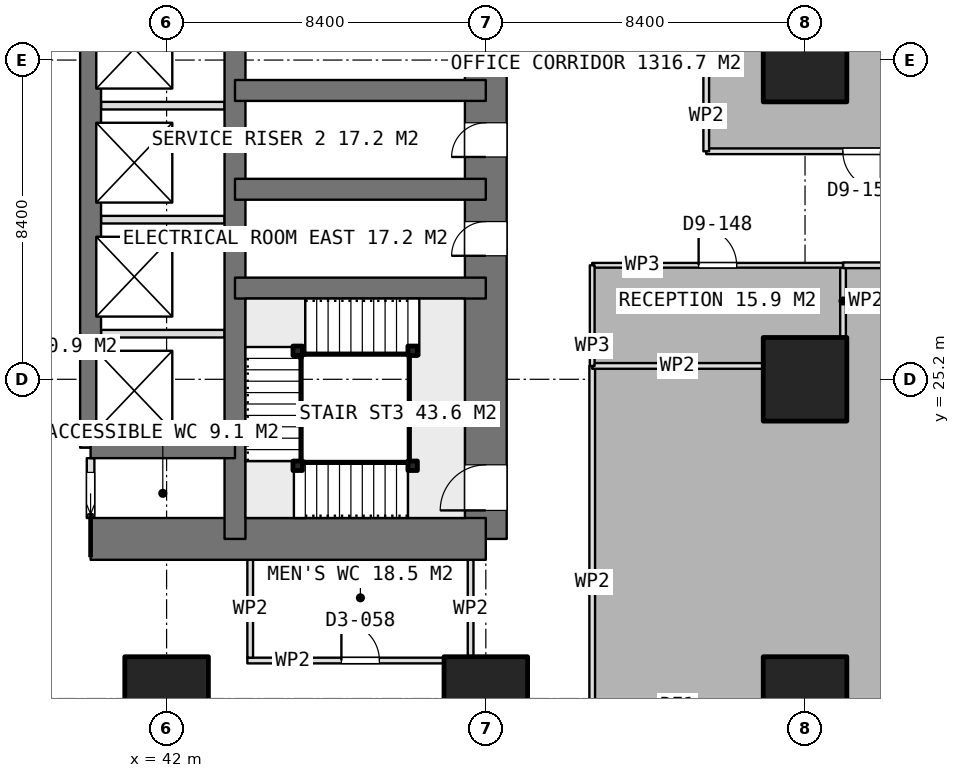
"""IFC4 building model, lengths in metres.
Left out: names, types, materials, properties, quantities, classifications, styles, units other than length and angle.
Written with IfcOpenShell. Run it as: python <this file> out.ifc"""

import sys

from ifc_helpers import new_model, si_unit, direction, frame, frame_2d, origin, origin_2d, place, context, subcontext, project, spatial, rectangle, extrude, element, fill, save


model = new_model("IFC4")
c1 = context("Model", 3, precision=1e-05, world=origin(), true_north=direction((0.0, 1.0)))
c2 = subcontext(c1, "Body", "Model", "MODEL_VIEW")
j1 = project(units=[si_unit("LENGTHUNIT", "METRE"), si_unit("PLANEANGLEUNIT", "RADIAN")], contexts=[c1])
p1 = place(None, origin())
s1 = spatial("IfcSite", under=j1, at=p1, CompositionType="ELEMENT")
p2 = place(p1, origin())
s2 = spatial("IfcBuilding", under=s1, at=p2, CompositionType="ELEMENT")
p3 = place(p2, frame((0.0, 0.0, 51.65)))
s3 = spatial("IfcBuildingStorey", under=s2, at=p3, CompositionType="ELEMENT", Elevation=51.65)
p4 = place(p3, frame((40.0, 21.0, 0.0), z_axis=(0.0, 0.0, 1.0), x_axis=(1.0, 0.0, 0.0)))
e1 = element("IfcWall", 1, at=p4, inside=s3, PredefinedType="SHEAR", context=c2, shape_type="SweptSolid", body=[
    extrude(rectangle(XDim=10.4, YDim=1.1, at=frame_2d((5.2, 0.0))), origin(), (0.0, 0.0, 1.0), 3.75),
])
p5 = place(p3, frame((50.4, 21.0, 0.0), z_axis=(0.0, 0.0, 1.0), x_axis=(0.0, 1.0, 0.0)))
e2 = element("IfcWall", 2, at=p5, inside=s3, PredefinedType="SHEAR", context=c2, shape_type="SweptSolid", body=[
    extrude(rectangle(XDim=25.2, YDim=1.1, at=frame_2d((12.6, 0.0))), origin(), (0.0, 0.0, 1.0), 3.75),
])
p6 = place(p5, frame((16.2, 0.0, 0.0)))
e3 = element("IfcOpeningElement", 3, at=p6, cuts=e2, PredefinedType="OPENING", context=c2, shape_type="SweptSolid", body=[
    extrude(rectangle(XDim=1.2, YDim=2.1, at=frame_2d((0.6, 1.05))), frame((0.0, 0.56, 0.0), z_axis=(0.0, -1.0, 0.0), x_axis=(1.0, 0.0, 0.0)), (0.0, 0.0, 1.0), 1.12),
])
p7 = place(p5, frame((10.05, 0.0, 0.0)))
e4 = element("IfcOpeningElement", 4, at=p7, cuts=e2, PredefinedType="OPENING", context=c2, shape_type="SweptSolid", body=[
    extrude(rectangle(XDim=0.9, YDim=2.1, at=frame_2d((0.45, 1.05))), frame((0.0, 0.56, 0.0), z_axis=(0.0, -1.0, 0.0), x_axis=(1.0, 0.0, 0.0)), (0.0, 0.0, 1.0), 1.12),
])
p8 = place(p5, frame((7.45, 0.0, 0.0)))
e5 = element("IfcOpeningElement", 5, at=p8, cuts=e2, PredefinedType="OPENING", context=c2, shape_type="SweptSolid", body=[
    extrude(rectangle(XDim=0.9, YDim=2.1, at=frame_2d((0.45, 1.05))), frame((0.0, 0.56, 0.0), z_axis=(0.0, -1.0, 0.0), x_axis=(1.0, 0.0, 0.0)), (0.0, 0.0, 1.0), 1.12),
])
p9 = place(p5, frame((0.75, 0.0, 0.0)))
e6 = element("IfcOpeningElement", 6, at=p9, cuts=e2, PredefinedType="OPENING", context=c2, shape_type="SweptSolid", body=[
    extrude(rectangle(XDim=1.2, YDim=2.1, at=frame_2d((0.6, 1.05))), frame((0.0, 0.56, 0.0), z_axis=(0.0, -1.0, 0.0), x_axis=(1.0, 0.0, 0.0)), (0.0, 0.0, 1.0), 1.12),
])
p10 = place(p3, frame((43.8, 21.0, 0.0), z_axis=(0.0, 0.0, 1.0), x_axis=(0.0, 1.0, 0.0)))
e7 = element("IfcWall", 7, at=p10, inside=s3, PredefinedType="SHEAR", context=c2, shape_type="SweptSolid", body=[
    extrude(rectangle(XDim=25.2, YDim=0.55, at=frame_2d((12.6, 0.0))), origin(), (0.0, 0.0, 1.0), 3.75),
])
p11 = place(p3, frame((40.0, 23.4, 0.0), z_axis=(0.0, 0.0, 1.0), x_axis=(0.0, 1.0, 0.0)))
e8 = element("IfcWall", 8, at=p11, inside=s3, PredefinedType="SHEAR", context=c2, shape_type="SweptSolid", body=[
    extrude(rectangle(XDim=18.0, YDim=0.55, at=frame_2d((9.0, 0.0))), origin(), (0.0, 0.0, 1.0), 3.75),
])
p12 = place(p3, frame((40.0, 23.4, 0.0), z_axis=(0.0, 0.0, 1.0), x_axis=(1.0, 0.0, 0.0)))
e9 = element("IfcWall", 9, at=p12, inside=s3, PredefinedType="SHEAR", context=c2, shape_type="SweptSolid", body=[
    extrude(rectangle(XDim=3.8, YDim=0.55, at=frame_2d((1.9, 0.0))), origin(), (0.0, 0.0, 1.0), 3.75),
])
for number, where, z_axis, x_axis in (
    (10, (43.8, 27.6, 0.0), (0.0, 0.0, 1.0), (1.0, 0.0, 0.0)),
    (11, (43.8, 30.2, 0.0), (0.0, 0.0, 1.0), (1.0, 0.0, 0.0)),
    (12, (43.8, 32.8, 0.0), (0.0, 0.0, 1.0), (1.0, 0.0, 0.0)),
):
    element("IfcWall", number, at=place(p3, frame(where, z_axis=z_axis, x_axis=x_axis)), inside=s3, PredefinedType="SHEAR", context=c2, shape_type="SweptSolid", body=[
        extrude(rectangle(XDim=6.6, YDim=0.55, at=frame_2d((3.3, 0.0))), origin(), (0.0, 0.0, 1.0), 3.75),
    ])
for number, where, z_axis, x_axis in (
    (13, (42.0, 16.8, 0.0), (0.0, 0.0, 1.0), (1.0, 0.0, 0.0)),
    (14, (50.4, 16.8, 0.0), (0.0, 0.0, 1.0), (1.0, 0.0, 0.0)),
    (15, (58.8, 16.8, 0.0), (0.0, 0.0, 1.0), (1.0, 0.0, 0.0)),
    (16, (58.8, 25.2, 0.0), (0.0, 0.0, 1.0), (1.0, 0.0, 0.0)),
    (17, (58.8, 33.6, 0.0), (0.0, 0.0, 1.0), (1.0, 0.0, 0.0)),
):
    element("IfcColumn", number, at=place(p3, frame(where, z_axis=z_axis, x_axis=x_axis)), inside=s3, PredefinedType="COLUMN", context=c2, shape_type="SweptSolid", body=[
        extrude(rectangle(XDim=2.2, YDim=2.2, at=origin_2d()), origin(), (0.0, 0.0, 1.0), 3.75),
    ])
for number, where, z_axis, x_axis in (
    (18, (40.275, 26.4, 0.0), (0.0, 0.0, 1.0), (1.0, 0.0, 0.0)),
    (19, (40.275, 29.4, 0.0), (0.0, 0.0, 1.0), (1.0, 0.0, 0.0)),
    (20, (40.275, 32.4, 0.0), (0.0, 0.0, 1.0), (1.0, 0.0, 0.0)),
):
    element("IfcWall", number, at=place(p3, frame(where, z_axis=z_axis, x_axis=x_axis)), inside=s3, PredefinedType="PARTITIONING", context=c2, shape_type="SweptSolid", body=[
        extrude(rectangle(XDim=3.25, YDim=0.2, at=frame_2d((1.625, 0.0))), origin(), (0.0, 0.0, 1.0), 3.5),
    ])
p13 = place(p3, frame((40.0, 21.55, 0.0), z_axis=(0.0, 0.0, 1.0), x_axis=(0.0, 1.0, 0.0)))
e21 = element("IfcWall", 21, at=p13, inside=s3, PredefinedType="PARTITIONING", context=c2, shape_type="SweptSolid", body=[
    extrude(rectangle(XDim=1.575, YDim=0.2, at=frame_2d((0.788, 0.0))), origin(), (0.0, 0.0, 1.0), 3.5),
])
p14 = place(p13, frame((0.1, 0.0, 0.0)))
e22 = element("IfcOpeningElement", 22, at=p14, cuts=e21, PredefinedType="OPENING", context=c2, shape_type="SweptSolid", body=[
    extrude(rectangle(XDim=1.1, YDim=2.1, at=frame_2d((0.55, 1.05))), frame((0.0, 0.11, 0.0), z_axis=(0.0, -1.0, 0.0), x_axis=(1.0, 0.0, 0.0)), (0.0, 0.0, 1.0), 0.22),
])
p15 = place(p3, frame((44.125, 17.8, 0.0), z_axis=(0.0, 0.0, 1.0), x_axis=(1.0, 0.0, 0.0)))
e23 = element("IfcWall", 23, at=p15, inside=s3, PredefinedType="PARTITIONING", context=c2, shape_type="SweptSolid", body=[
    extrude(rectangle(XDim=5.95, YDim=0.15, at=frame_2d((2.975, 0.0))), origin(), (0.0, 0.0, 1.0), 3.5),
])
p16 = place(p15, frame((2.475, 0.0, 0.0)))
e24 = element("IfcOpeningElement", 24, at=p16, cuts=e23, PredefinedType="OPENING", context=c2, shape_type="SweptSolid", body=[
    extrude(rectangle(XDim=1.0, YDim=2.1, at=frame_2d((0.5, 1.05))), frame((0.0, 0.085, 0.0), z_axis=(0.0, -1.0, 0.0), x_axis=(1.0, 0.0, 0.0)), (0.0, 0.0, 1.0), 0.17),
])
for number, where, z_axis, x_axis in (
    (25, (44.2, 17.875, 0.0), (0.0, 0.0, 1.0), (0.0, 1.0, 0.0)),
    (26, (50.0, 17.875, 0.0), (0.0, 0.0, 1.0), (0.0, 1.0, 0.0)),
):
    element("IfcWall", number, at=place(p3, frame(where, z_axis=z_axis, x_axis=x_axis)), inside=s3, PredefinedType="PARTITIONING", context=c2, shape_type="SweptSolid", body=[
        extrude(rectangle(XDim=2.575, YDim=0.15, at=frame_2d((1.288, 0.0))), origin(), (0.0, 0.0, 1.0), 3.5),
    ])
p17 = place(p3, frame((53.2, 14.2, 0.0), z_axis=(0.0, 0.0, 1.0), x_axis=(0.0, 1.0, 0.0)))
e27 = element("IfcWall", 27, at=p17, inside=s3, PredefinedType="PARTITIONING", context=c2, shape_type="SweptSolid", body=[
    extrude(rectangle(XDim=11.352, YDim=0.15, at=frame_2d((5.676, 0.0))), origin(), (0.0, 0.0, 1.0), 3.5),
])
p18 = place(p3, frame((53.2, 25.552, 0.0), z_axis=(0.0, 0.0, 1.0), x_axis=(1.0, 0.0, 0.0)))
e28 = element("IfcWall", 28, at=p18, inside=s3, PredefinedType="PARTITIONING", context=c2, shape_type="SweptSolid", body=[
    extrude(rectangle(XDim=4.48, YDim=0.15, at=frame_2d((2.24, 0.0))), origin(), (0.0, 0.0, 1.0), 3.5),
])
p19 = place(p3, frame((59.8, 26.32, 0.0), z_axis=(0.0, 0.0, 1.0), x_axis=(0.0, 1.0, 0.0)))
e29 = element("IfcWall", 29, at=p19, inside=s3, PredefinedType="PARTITIONING", context=c2, shape_type="SweptSolid", body=[
    extrude(rectangle(XDim=1.88, YDim=0.15, at=frame_2d((0.94, 0.0))), origin(), (0.0, 0.0, 1.0), 3.5),
])
p20 = place(p3, frame((59.8, 28.2, 0.0), z_axis=(0.0, 0.0, 1.0), x_axis=(1.0, 0.0, 0.0)))
e30 = element("IfcWall", 30, at=p20, inside=s3, PredefinedType="PARTITIONING", context=c2, shape_type="SweptSolid", body=[
    extrude(rectangle(XDim=4.719, YDim=0.15, at=frame_2d((2.359, 0.0))), origin(), (0.0, 0.0, 1.0), 3.5),
])
p21 = place(p3, frame((53.2, 28.2, 0.0), z_axis=(0.0, 0.0, 1.0), x_axis=(1.0, 0.0, 0.0)))
e31 = element("IfcWall", 31, at=p21, inside=s3, PredefinedType="PARTITIONING", context=c2, shape_type="SweptSolid", body=[
    extrude(rectangle(XDim=6.6, YDim=0.125, at=frame_2d((3.3, 0.0))), origin(), (0.0, 0.0, 1.0), 3.5),
])
p22 = place(p21, frame((2.8, 0.0, 0.0)))
e32 = element("IfcOpeningElement", 32, at=p22, cuts=e31, PredefinedType="OPENING", context=c2, shape_type="SweptSolid", body=[
    extrude(rectangle(XDim=1.0, YDim=2.1, at=frame_2d((0.5, 1.05))), frame((0.0, 0.073, 0.0), z_axis=(0.0, -1.0, 0.0), x_axis=(1.0, 0.0, 0.0)), (0.0, 0.0, 1.0), 0.145),
])
p23 = place(p3, frame((53.2, 25.552, 0.0), z_axis=(0.0, 0.0, 1.0), x_axis=(0.0, 1.0, 0.0)))
e33 = element("IfcWall", 33, at=p23, inside=s3, PredefinedType="PARTITIONING", context=c2, shape_type="SweptSolid", body=[
    extrude(rectangle(XDim=2.648, YDim=0.125, at=frame_2d((1.324, 0.0))), origin(), (0.0, 0.0, 1.0), 3.5),
])
p24 = place(p3, frame((64.391, 31.2, 0.0), z_axis=(0.0, 0.0, 1.0), x_axis=(-1.0, 0.0, 0.0)))
e34 = element("IfcWall", 34, at=p24, inside=s3, PredefinedType="PARTITIONING", context=c2, shape_type="SweptSolid", body=[
    extrude(rectangle(XDim=8.191, YDim=0.15, at=frame_2d((4.096, 0.0))), origin(), (0.0, 0.0, 1.0), 3.5),
])
p25 = place(p24, frame((3.596, 0.0, 0.0)))
e35 = element("IfcOpeningElement", 35, at=p25, cuts=e34, PredefinedType="OPENING", context=c2, shape_type="SweptSolid", body=[
    extrude(rectangle(XDim=1.0, YDim=2.1, at=frame_2d((0.5, 1.05))), frame((0.0, 0.085, 0.0), z_axis=(0.0, -1.0, 0.0), x_axis=(1.0, 0.0, 0.0)), (0.0, 0.0, 1.0), 0.17),
])
p26 = place(p3, frame((56.2, 31.2, 0.0), z_axis=(0.0, 0.0, 1.0), x_axis=(0.0, 1.0, 0.0)))
e36 = element("IfcWall", 36, at=p26, inside=s3, PredefinedType="PARTITIONING", context=c2, shape_type="SweptSolid", body=[
    extrude(rectangle(XDim=4.6, YDim=0.15, at=frame_2d((2.3, 0.0))), origin(), (0.0, 0.0, 1.0), 3.5),
])
for number, where, z_axis, x_axis in (
    (37, (48.475, 22.925, 0.0), (0.0, 0.0, 1.0), (1.0, 0.0, 0.0)),
    (38, (45.45, 22.925, 0.0), (0.0, 0.0, 1.0), (1.0, 0.0, 0.0)),
    (39, (45.45, 25.95, 0.0), (0.0, 0.0, 1.0), (1.0, 0.0, 0.0)),
    (40, (48.475, 25.95, 0.0), (0.0, 0.0, 1.0), (1.0, 0.0, 0.0)),
):
    element("IfcColumn", number, at=place(p3, frame(where, z_axis=z_axis, x_axis=x_axis)), inside=s3, PredefinedType="COLUMN", context=c2, shape_type="SweptSolid", body=[
        extrude(rectangle(XDim=0.25, YDim=0.25, at=origin_2d()), origin(), (0.0, 0.0, 1.0), 3.75),
    ])
p27 = place(p7, origin())
e41 = element("IfcDoor", 41, at=p27, inside=s3, OperationType="SINGLE_SWING_LEFT", PredefinedType="DOOR", context=c2, shape_type="SweptSolid", body=[
    extrude(rectangle(XDim=0.9, YDim=2.1, at=frame_2d((0.45, 1.05))), frame((0.0, 0.025, 0.0), z_axis=(0.0, -1.0, 0.0), x_axis=(1.0, 0.0, 0.0)), (0.0, 0.0, 1.0), 0.05),
])
fill(e4, e41)
p28 = place(p8, origin())
e42 = element("IfcDoor", 42, at=p28, inside=s3, OperationType="SINGLE_SWING_LEFT", PredefinedType="DOOR", context=c2, shape_type="SweptSolid", body=[
    extrude(rectangle(XDim=0.9, YDim=2.1, at=frame_2d((0.45, 1.05))), frame((0.0, 0.025, 0.0), z_axis=(0.0, -1.0, 0.0), x_axis=(1.0, 0.0, 0.0)), (0.0, 0.0, 1.0), 0.05),
])
fill(e5, e42)
p29 = place(p14, origin())
e43 = element("IfcDoor", 43, at=p29, inside=s3, OperationType="SLIDING_TO_LEFT", PredefinedType="DOOR", context=c2, shape_type="SweptSolid", body=[
    extrude(rectangle(XDim=1.1, YDim=2.1, at=frame_2d((0.55, 1.05))), frame((0.0, 0.025, 0.0), z_axis=(0.0, -1.0, 0.0), x_axis=(1.0, 0.0, 0.0)), (0.0, 0.0, 1.0), 0.05),
])
fill(e22, e43)
p30 = place(p16, origin())
e44 = element("IfcDoor", 44, at=p30, inside=s3, OperationType="SINGLE_SWING_LEFT", PredefinedType="DOOR", context=c2, shape_type="SweptSolid", body=[
    extrude(rectangle(XDim=1.0, YDim=2.1, at=frame_2d((0.5, 1.05))), frame((0.0, 0.025, 0.0), z_axis=(0.0, -1.0, 0.0), x_axis=(1.0, 0.0, 0.0)), (0.0, 0.0, 1.0), 0.05),
])
fill(e24, e44)
p31 = place(p22, origin())
e45 = element("IfcDoor", 45, at=p31, inside=s3, OperationType="SINGLE_SWING_LEFT", PredefinedType="DOOR", context=c2, shape_type="SweptSolid", body=[
    extrude(rectangle(XDim=1.0, YDim=2.1, at=frame_2d((0.5, 1.05))), frame((0.0, 0.025, 0.0), z_axis=(0.0, -1.0, 0.0), x_axis=(1.0, 0.0, 0.0)), (0.0, 0.0, 1.0), 0.05),
])
fill(e32, e45)
p32 = place(p25, origin())
e46 = element("IfcDoor", 46, at=p32, inside=s3, OperationType="SINGLE_SWING_LEFT", PredefinedType="DOOR", context=c2, shape_type="SweptSolid", body=[
    extrude(rectangle(XDim=1.0, YDim=2.1, at=frame_2d((0.5, 1.05))), frame((0.0, 0.025, 0.0), z_axis=(0.0, -1.0, 0.0), x_axis=(1.0, 0.0, 0.0)), (0.0, 0.0, 1.0), 0.05),
])
fill(e35, e46)
p33 = place(p9, origin())
e47 = element("IfcDoor", 47, at=p33, inside=s3, OperationType="SINGLE_SWING_RIGHT", PredefinedType="DOOR", context=c2, shape_type="SweptSolid", body=[
    extrude(rectangle(XDim=1.2, YDim=2.1, at=frame_2d((0.6, 1.05))), frame((0.0, 0.025, 0.0), z_axis=(0.0, -1.0, 0.0), x_axis=(1.0, 0.0, 0.0)), (0.0, 0.0, 1.0), 0.05),
])
fill(e6, e47)
save(model, sys.argv[1])
